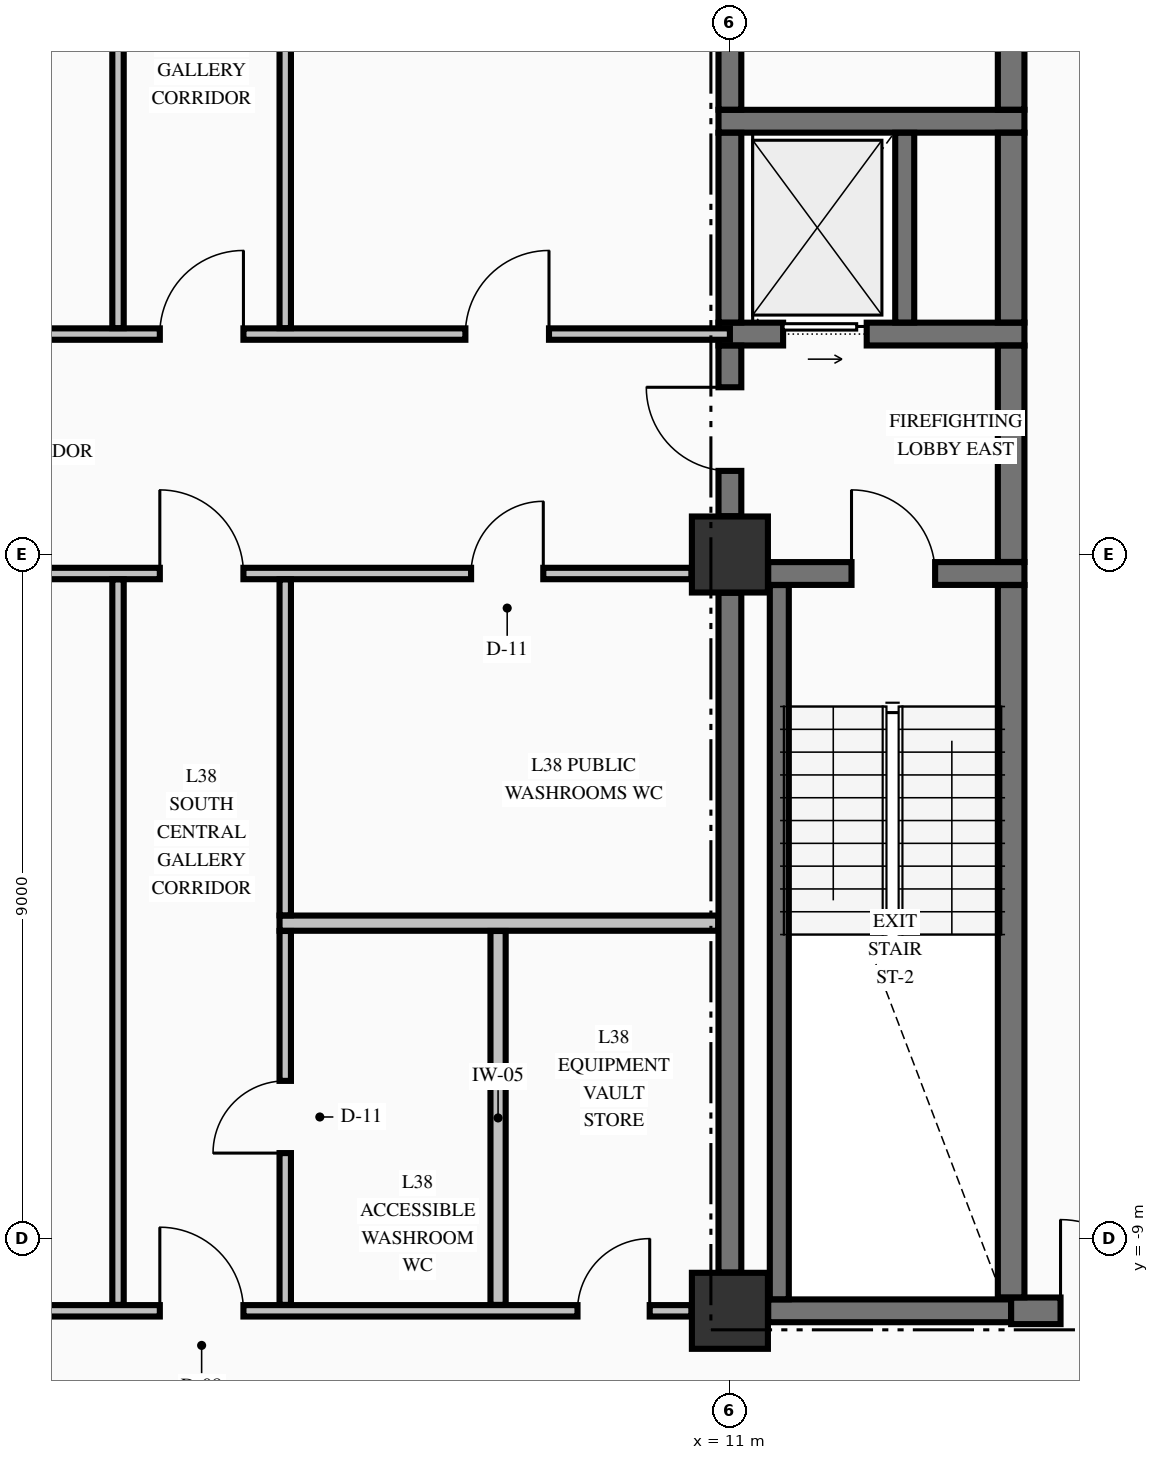
"""IFC4 building model, lengths in metres.
Left out: names, types, materials, properties, quantities, classifications, styles, units other than length and angle.
Written with IfcOpenShell. Run it as: python <this file> out.ifc"""

import sys

from ifc_helpers import new_model, si_unit, direction, frame, frame_2d, origin, origin_2d, place, context, subcontext, project, spatial, rectangle, extrude, element, fill, save


model = new_model("IFC4")
c1 = context("Model", 3, precision=1e-05, world=origin(), true_north=direction((0.0, 1.0)))
c2 = subcontext(c1, "Body", "Model", "MODEL_VIEW")
j1 = project(units=[si_unit("LENGTHUNIT", "METRE"), si_unit("PLANEANGLEUNIT", "RADIAN")], contexts=[c1])
p1 = place(None, origin())
s1 = spatial("IfcSite", under=j1, at=p1, CompositionType="ELEMENT")
p2 = place(p1, origin())
s2 = spatial("IfcBuilding", under=s1, at=p2, CompositionType="ELEMENT")
p3 = place(p2, frame((0.0, 0.0, 149.91)))
s3 = spatial("IfcBuildingStorey", under=s2, at=p3, CompositionType="ELEMENT", Elevation=149.91)
for number, where, z_axis, x_axis in (
    (1, (11.0, -9.95, -0.25), (0.0, 0.0, 1.0), (1.0, 0.0, 0.0)),
    (2, (11.0, 0.0, -0.25), (0.0, 0.0, 1.0), (1.0, 0.0, 0.0)),
):
    element("IfcColumn", number, at=place(p3, frame(where, z_axis=z_axis, x_axis=x_axis)), inside=s3, PredefinedType="COLUMN", context=c2, shape_type="SweptSolid", body=[
        extrude(rectangle(XDim=1.0, YDim=1.0, at=origin_2d()), origin(), (0.0, 0.0, 1.0), 3.395),
    ])
p4 = place(p3, frame((11.504, -9.95, 0.0), z_axis=(0.0, 0.0, 1.0), x_axis=(1.0, 0.0, 0.0)))
e3 = element("IfcWall", 3, at=p4, inside=s3, PredefinedType="SHEAR", context=c2, shape_type="SweptSolid", body=[
    extrude(rectangle(XDim=3.196, YDim=0.3, at=frame_2d((1.598, 0.0))), origin(), (0.0, 0.0, 1.0), 3.145),
])
p5 = place(p3, frame((14.7, -9.95, 0.0), z_axis=(0.0, 0.0, 1.0), x_axis=(1.0, 0.0, 0.0)))
e4 = element("IfcWall", 4, at=p5, inside=s3, PredefinedType="SHEAR", context=c2, shape_type="SweptSolid", body=[
    extrude(rectangle(XDim=4.796, YDim=0.35, at=frame_2d((2.398, 0.0))), origin(), (0.0, 0.0, 1.0), 3.145),
])
p6 = place(p5, frame((0.65, 0.0, 0.0)))
e5 = element("IfcOpeningElement", 5, at=p6, cuts=e4, PredefinedType="OPENING", context=c2, shape_type="SweptSolid", body=[
    extrude(rectangle(XDim=1.2, YDim=2.15, at=frame_2d((0.6, 1.075))), frame((0.0, 0.185, 0.0), z_axis=(0.0, -1.0, 0.0), x_axis=(1.0, 0.0, 0.0)), (0.0, 0.0, 1.0), 0.37),
])
p7 = place(p3, frame((11.504, -0.25, 0.0), z_axis=(0.0, 0.0, 1.0), x_axis=(1.0, 0.0, 0.0)))
e6 = element("IfcWall", 6, at=p7, inside=s3, PredefinedType="SHEAR", context=c2, shape_type="SweptSolid", body=[
    extrude(rectangle(XDim=3.371, YDim=0.3, at=frame_2d((1.686, 0.0))), origin(), (0.0, 0.0, 1.0), 3.145),
])
p8 = place(p7, frame((1.096, 0.0, 0.0)))
e7 = element("IfcOpeningElement", 7, at=p8, cuts=e6, PredefinedType="OPENING", context=c2, shape_type="SweptSolid", body=[
    extrude(rectangle(XDim=1.1, YDim=2.15, at=frame_2d((0.55, 1.075))), frame((0.0, 0.16, 0.0), z_axis=(0.0, -1.0, 0.0), x_axis=(1.0, 0.0, 0.0)), (0.0, 0.0, 1.0), 0.32),
])
p9 = place(p3, frame((10.85, 2.9, 0.0), z_axis=(0.0, 0.0, 1.0), x_axis=(1.0, 0.0, 0.0)))
e8 = element("IfcWall", 8, at=p9, inside=s3, PredefinedType="SHEAR", context=c2, shape_type="SweptSolid", body=[
    extrude(rectangle(XDim=4.025, YDim=0.3, at=frame_2d((2.012, 0.0))), origin(), (0.0, 0.0, 1.0), 3.145),
])
p10 = place(p9, frame((0.85, 0.0, 0.0)))
e9 = element("IfcOpeningElement", 9, at=p10, cuts=e8, PredefinedType="OPENING", context=c2, shape_type="SweptSolid", body=[
    extrude(rectangle(XDim=1.1, YDim=2.2, at=frame_2d((0.55, 1.1))), frame((0.0, 0.16, 0.0), z_axis=(0.0, -1.0, 0.0), x_axis=(1.0, 0.0, 0.0)), (0.0, 0.0, 1.0), 0.32),
])
p11 = place(p3, frame((10.85, 5.7, 0.0), z_axis=(0.0, 0.0, 1.0), x_axis=(1.0, 0.0, 0.0)))
e10 = element("IfcWall", 10, at=p11, inside=s3, PredefinedType="SHEAR", context=c2, shape_type="SweptSolid", body=[
    extrude(rectangle(XDim=4.025, YDim=0.3, at=frame_2d((2.012, 0.0))), origin(), (0.0, 0.0, 1.0), 3.145),
])
p12 = place(p3, frame((-10.494, -9.95, 0.0), z_axis=(0.0, 0.0, 1.0), x_axis=(1.0, 0.0, 0.0)))
e11 = element("IfcWall", 11, at=p12, inside=s3, PredefinedType="PARTITIONING", context=c2, shape_type="SweptSolid", body=[
    extrude(rectangle(XDim=20.988, YDim=0.15, at=frame_2d((10.494, 0.0))), origin(), (0.0, 0.0, 1.0), 3.145),
])
p13 = place(p12, frame((13.994, 0.0, 0.0)))
e12 = element("IfcOpeningElement", 12, at=p13, cuts=e11, PredefinedType="OPENING", context=c2, shape_type="SweptSolid", body=[
    extrude(rectangle(XDim=1.1, YDim=2.15, at=frame_2d((0.55, 1.075))), frame((0.0, 0.085, 0.0), z_axis=(0.0, -1.0, 0.0), x_axis=(1.0, 0.0, 0.0)), (0.0, 0.0, 1.0), 0.17),
])
p14 = place(p12, frame((19.489, 0.0, 0.0)))
e13 = element("IfcOpeningElement", 13, at=p14, cuts=e11, PredefinedType="OPENING", context=c2, shape_type="SweptSolid", body=[
    extrude(rectangle(XDim=0.95, YDim=2.15, at=frame_2d((0.475, 1.075))), frame((0.0, 0.085, 0.0), z_axis=(0.0, -1.0, 0.0), x_axis=(1.0, 0.0, 0.0)), (0.0, 0.0, 1.0), 0.17),
])
p15 = place(p3, frame((5.075, -4.85, 0.0), z_axis=(0.0, 0.0, 1.0), x_axis=(1.0, 0.0, 0.0)))
e14 = element("IfcWall", 14, at=p15, inside=s3, PredefinedType="PARTITIONING", context=c2, shape_type="SweptSolid", body=[
    extrude(rectangle(XDim=5.772, YDim=0.2, at=frame_2d((2.886, 0.0))), origin(), (0.0, 0.0, 1.0), 3.145),
])
p16 = place(p3, frame((-10.494, -0.25, 0.0), z_axis=(0.0, 0.0, 1.0), x_axis=(1.0, 0.0, 0.0)))
e15 = element("IfcWall", 15, at=p16, inside=s3, PredefinedType="PARTITIONING", context=c2, shape_type="SweptSolid", body=[
    extrude(rectangle(XDim=20.988, YDim=0.15, at=frame_2d((10.494, 0.0))), origin(), (0.0, 0.0, 1.0), 3.145),
])
p17 = place(p16, frame((13.994, 0.0, 0.0)))
e16 = element("IfcOpeningElement", 16, at=p17, cuts=e15, PredefinedType="OPENING", context=c2, shape_type="SweptSolid", body=[
    extrude(rectangle(XDim=1.1, YDim=2.15, at=frame_2d((0.55, 1.075))), frame((0.0, 0.085, 0.0), z_axis=(0.0, -1.0, 0.0), x_axis=(1.0, 0.0, 0.0)), (0.0, 0.0, 1.0), 0.17),
])
p18 = place(p16, frame((5.939, 0.0, 0.0)))
e17 = element("IfcOpeningElement", 17, at=p18, cuts=e15, PredefinedType="OPENING", context=c2, shape_type="SweptSolid", body=[
    extrude(rectangle(XDim=1.05, YDim=2.15, at=frame_2d((0.525, 1.075))), frame((0.0, 0.085, 0.0), z_axis=(0.0, -1.0, 0.0), x_axis=(1.0, 0.0, 0.0)), (0.0, 0.0, 1.0), 0.17),
])
p19 = place(p16, frame((18.089, 0.0, 0.0)))
e18 = element("IfcOpeningElement", 18, at=p19, cuts=e15, PredefinedType="OPENING", context=c2, shape_type="SweptSolid", body=[
    extrude(rectangle(XDim=0.95, YDim=2.15, at=frame_2d((0.475, 1.075))), frame((0.0, 0.085, 0.0), z_axis=(0.0, -1.0, 0.0), x_axis=(1.0, 0.0, 0.0)), (0.0, 0.0, 1.0), 0.17),
])
p20 = place(p3, frame((-11.0, 2.9, 0.0), z_axis=(0.0, 0.0, 1.0), x_axis=(1.0, 0.0, 0.0)))
e19 = element("IfcWall", 19, at=p20, inside=s3, PredefinedType="PARTITIONING", context=c2, shape_type="SweptSolid", body=[
    extrude(rectangle(XDim=22.0, YDim=0.15, at=frame_2d((11.0, 0.0))), origin(), (0.0, 0.0, 1.0), 3.145),
])
p21 = place(p20, frame((14.5, 0.0, 0.0)))
e20 = element("IfcOpeningElement", 20, at=p21, cuts=e19, PredefinedType="OPENING", context=c2, shape_type="SweptSolid", body=[
    extrude(rectangle(XDim=1.1, YDim=2.15, at=frame_2d((0.55, 1.075))), frame((0.0, 0.085, 0.0), z_axis=(0.0, -1.0, 0.0), x_axis=(1.0, 0.0, 0.0)), (0.0, 0.0, 1.0), 0.17),
])
p22 = place(p20, frame((6.445, 0.0, 0.0)))
e21 = element("IfcOpeningElement", 21, at=p22, cuts=e19, PredefinedType="OPENING", context=c2, shape_type="SweptSolid", body=[
    extrude(rectangle(XDim=1.05, YDim=2.15, at=frame_2d((0.525, 1.075))), frame((0.0, 0.085, 0.0), z_axis=(0.0, -1.0, 0.0), x_axis=(1.0, 0.0, 0.0)), (0.0, 0.0, 1.0), 0.17),
])
p23 = place(p20, frame((18.52, 0.0, 0.0)))
e22 = element("IfcOpeningElement", 22, at=p23, cuts=e19, PredefinedType="OPENING", context=c2, shape_type="SweptSolid", body=[
    extrude(rectangle(XDim=1.1, YDim=2.15, at=frame_2d((0.55, 1.075))), frame((0.0, 0.085, 0.0), z_axis=(0.0, -1.0, 0.0), x_axis=(1.0, 0.0, 0.0)), (0.0, 0.0, 1.0), 0.17),
])
p24 = place(p3, frame((11.0, -9.446, 0.0), z_axis=(0.0, 0.0, 1.0), x_axis=(0.0, 1.0, 0.0)))
e23 = element("IfcWall", 23, at=p24, inside=s3, PredefinedType="SHEAR", context=c2, shape_type="SweptSolid", body=[
    extrude(rectangle(XDim=8.942, YDim=0.3, at=frame_2d((4.471, 0.0))), origin(), (0.0, 0.0, 1.0), 3.145),
])
p25 = place(p3, frame((11.0, 0.504, 0.0), z_axis=(0.0, 0.0, 1.0), x_axis=(0.0, 1.0, 0.0)))
e24 = element("IfcWall", 24, at=p25, inside=s3, PredefinedType="SHEAR", context=c2, shape_type="SweptSolid", body=[
    extrude(rectangle(XDim=2.244, YDim=0.3, at=frame_2d((1.122, 0.0))), origin(), (0.0, 0.0, 1.0), 3.145),
])
p26 = place(p25, frame((0.596, 0.0, 0.0)))
e25 = element("IfcOpeningElement", 25, at=p26, cuts=e24, PredefinedType="OPENING", context=c2, shape_type="SweptSolid", body=[
    extrude(rectangle(XDim=1.1, YDim=2.15, at=frame_2d((0.55, 1.075))), frame((0.0, 0.16, 0.0), z_axis=(0.0, -1.0, 0.0), x_axis=(1.0, 0.0, 0.0)), (0.0, 0.0, 1.0), 0.32),
])
p27 = place(p3, frame((11.0, 3.052, 0.0), z_axis=(0.0, 0.0, 1.0), x_axis=(0.0, 1.0, 0.0)))
e26 = element("IfcWall", 26, at=p27, inside=s3, PredefinedType="SHEAR", context=c2, shape_type="SweptSolid", body=[
    extrude(rectangle(XDim=2.496, YDim=0.3, at=frame_2d((1.248, 0.0))), origin(), (0.0, 0.0, 1.0), 3.145),
])
p28 = place(p3, frame((11.0, 5.852, 0.0), z_axis=(0.0, 0.0, 1.0), x_axis=(0.0, 1.0, 0.0)))
e27 = element("IfcWall", 27, at=p28, inside=s3, PredefinedType="SHEAR", context=c2, shape_type="SweptSolid", body=[
    extrude(rectangle(XDim=4.144, YDim=0.3, at=frame_2d((2.072, 0.0))), origin(), (0.0, 0.0, 1.0), 3.145),
])
p29 = place(p3, frame((11.65, -9.798, 0.0), z_axis=(0.0, 0.0, 1.0), x_axis=(0.0, 1.0, 0.0)))
e28 = element("IfcWall", 28, at=p29, inside=s3, PredefinedType="SOLIDWALL", context=c2, shape_type="SweptSolid", body=[
    extrude(rectangle(XDim=9.396, YDim=0.25, at=frame_2d((4.698, 0.0))), origin(), (0.0, 0.0, 1.0), 3.145),
])
p30 = place(p3, frame((13.3, 3.052, 0.0), z_axis=(0.0, 0.0, 1.0), x_axis=(0.0, 1.0, 0.0)))
e29 = element("IfcWall", 29, at=p30, inside=s3, PredefinedType="SOLIDWALL", context=c2, shape_type="SweptSolid", body=[
    extrude(rectangle(XDim=2.496, YDim=0.25, at=frame_2d((1.248, 0.0))), origin(), (0.0, 0.0, 1.0), 3.145),
])
p31 = place(p3, frame((14.7, -9.773, 0.0), z_axis=(0.0, 0.0, 1.0), x_axis=(0.0, 1.0, 0.0)))
e30 = element("IfcWall", 30, at=p31, inside=s3, PredefinedType="SHEAR", context=c2, shape_type="SweptSolid", body=[
    extrude(rectangle(XDim=9.371, YDim=0.35, at=frame_2d((4.686, 0.0))), origin(), (0.0, 0.0, 1.0), 3.145),
])
p32 = place(p3, frame((14.7, -0.098, 0.0), z_axis=(0.0, 0.0, 1.0), x_axis=(0.0, 1.0, 0.0)))
e31 = element("IfcWall", 31, at=p32, inside=s3, PredefinedType="SHEAR", context=c2, shape_type="SweptSolid", body=[
    extrude(rectangle(XDim=2.846, YDim=0.35, at=frame_2d((1.423, 0.0))), origin(), (0.0, 0.0, 1.0), 3.145),
])
p33 = place(p3, frame((14.7, 3.052, 0.0), z_axis=(0.0, 0.0, 1.0), x_axis=(0.0, 1.0, 0.0)))
e32 = element("IfcWall", 32, at=p33, inside=s3, PredefinedType="SHEAR", context=c2, shape_type="SweptSolid", body=[
    extrude(rectangle(XDim=2.496, YDim=0.35, at=frame_2d((1.248, 0.0))), origin(), (0.0, 0.0, 1.0), 3.145),
])
p34 = place(p3, frame((14.7, 5.852, 0.0), z_axis=(0.0, 0.0, 1.0), x_axis=(0.0, 1.0, 0.0)))
e33 = element("IfcWall", 33, at=p34, inside=s3, PredefinedType="SHEAR", context=c2, shape_type="SweptSolid", body=[
    extrude(rectangle(XDim=4.471, YDim=0.35, at=frame_2d((2.235, 0.0))), origin(), (0.0, 0.0, 1.0), 3.145),
])
p35 = place(p3, frame((2.95, -9.872, 0.0), z_axis=(0.0, 0.0, 1.0), x_axis=(0.0, 1.0, 0.0)))
e34 = element("IfcWall", 34, at=p35, inside=s3, PredefinedType="PARTITIONING", context=c2, shape_type="SweptSolid", body=[
    extrude(rectangle(XDim=9.544, YDim=0.15, at=frame_2d((4.772, 0.0))), origin(), (0.0, 0.0, 1.0), 3.145),
])
p36 = place(p3, frame((2.95, 2.978, 0.0), z_axis=(0.0, 0.0, 1.0), x_axis=(0.0, 1.0, 0.0)))
e35 = element("IfcWall", 35, at=p36, inside=s3, PredefinedType="PARTITIONING", context=c2, shape_type="SweptSolid", body=[
    extrude(rectangle(XDim=7.444, YDim=0.15, at=frame_2d((3.722, 0.0))), origin(), (0.0, 0.0, 1.0), 3.145),
])
p37 = place(p3, frame((5.15, -9.872, 0.0), z_axis=(0.0, 0.0, 1.0), x_axis=(0.0, 1.0, 0.0)))
e36 = element("IfcWall", 36, at=p37, inside=s3, PredefinedType="PARTITIONING", context=c2, shape_type="SweptSolid", body=[
    extrude(rectangle(XDim=4.919, YDim=0.15, at=frame_2d((2.459, 0.0))), origin(), (0.0, 0.0, 1.0), 3.145),
])
p38 = place(p37, frame((1.997, 0.0, 0.0)))
e37 = element("IfcOpeningElement", 37, at=p38, cuts=e36, PredefinedType="OPENING", context=c2, shape_type="SweptSolid", body=[
    extrude(rectangle(XDim=0.95, YDim=2.15, at=frame_2d((0.475, 1.075))), frame((0.0, 0.085, 0.0), z_axis=(0.0, -1.0, 0.0), x_axis=(1.0, 0.0, 0.0)), (0.0, 0.0, 1.0), 0.17),
])
p39 = place(p3, frame((5.15, -4.747, 0.0), z_axis=(0.0, 0.0, 1.0), x_axis=(0.0, 1.0, 0.0)))
e38 = element("IfcWall", 38, at=p39, inside=s3, PredefinedType="PARTITIONING", context=c2, shape_type="SweptSolid", body=[
    extrude(rectangle(XDim=4.419, YDim=0.15, at=frame_2d((2.209, 0.0))), origin(), (0.0, 0.0, 1.0), 3.145),
])
p40 = place(p3, frame((5.15, 2.978, 0.0), z_axis=(0.0, 0.0, 1.0), x_axis=(0.0, 1.0, 0.0)))
e39 = element("IfcWall", 39, at=p40, inside=s3, PredefinedType="PARTITIONING", context=c2, shape_type="SweptSolid", body=[
    extrude(rectangle(XDim=7.444, YDim=0.15, at=frame_2d((3.722, 0.0))), origin(), (0.0, 0.0, 1.0), 3.145),
])
p41 = place(p3, frame((7.95, -9.872, 0.0), z_axis=(0.0, 0.0, 1.0), x_axis=(0.0, 1.0, 0.0)))
e40 = element("IfcWall", 40, at=p41, inside=s3, PredefinedType="PARTITIONING", context=c2, shape_type="SweptSolid", body=[
    extrude(rectangle(XDim=4.919, YDim=0.2, at=frame_2d((2.459, 0.0))), origin(), (0.0, 0.0, 1.0), 3.145),
])
p42 = place(p8, origin())
e41 = element("IfcDoor", 41, at=p42, inside=s3, OperationType="SINGLE_SWING_LEFT", PredefinedType="DOOR", context=c2, shape_type="SweptSolid", body=[
    extrude(rectangle(XDim=1.1, YDim=2.15, at=frame_2d((0.55, 1.075))), frame((0.0, 0.025, 0.0), z_axis=(0.0, -1.0, 0.0), x_axis=(1.0, 0.0, 0.0)), (0.0, 0.0, 1.0), 0.05),
])
fill(e7, e41)
p43 = place(p26, origin())
e42 = element("IfcDoor", 42, at=p43, inside=s3, OperationType="SINGLE_SWING_RIGHT", PredefinedType="DOOR", context=c2, shape_type="SweptSolid", body=[
    extrude(rectangle(XDim=1.1, YDim=2.15, at=frame_2d((0.55, 1.075))), frame((0.0, 0.025, 0.0), z_axis=(0.0, -1.0, 0.0), x_axis=(1.0, 0.0, 0.0)), (0.0, 0.0, 1.0), 0.05),
])
fill(e25, e42)
p44 = place(p10, origin())
e43 = element("IfcDoor", 43, at=p44, inside=s3, OperationType="SLIDING_TO_RIGHT", PredefinedType="DOOR", context=c2, shape_type="SweptSolid", body=[
    extrude(rectangle(XDim=1.1, YDim=2.2, at=frame_2d((0.55, 1.1))), frame((0.0, 0.025, 0.0), z_axis=(0.0, -1.0, 0.0), x_axis=(1.0, 0.0, 0.0)), (0.0, 0.0, 1.0), 0.05),
])
fill(e9, e43)
p45 = place(p6, origin())
e44 = element("IfcDoor", 44, at=p45, inside=s3, OperationType="SINGLE_SWING_LEFT", PredefinedType="DOOR", context=c2, shape_type="SweptSolid", body=[
    extrude(rectangle(XDim=1.2, YDim=2.15, at=frame_2d((0.6, 1.075))), frame((0.0, 0.025, 0.0), z_axis=(0.0, -1.0, 0.0), x_axis=(1.0, 0.0, 0.0)), (0.0, 0.0, 1.0), 0.05),
])
fill(e5, e44)
p46 = place(p13, origin())
e45 = element("IfcDoor", 45, at=p46, inside=s3, OperationType="SINGLE_SWING_LEFT", PredefinedType="DOOR", context=c2, shape_type="SweptSolid", body=[
    extrude(rectangle(XDim=1.1, YDim=2.15, at=frame_2d((0.55, 1.075))), frame((0.0, 0.025, 0.0), z_axis=(0.0, -1.0, 0.0), x_axis=(1.0, 0.0, 0.0)), (0.0, 0.0, 1.0), 0.05),
])
fill(e12, e45)
p47 = place(p21, origin())
e46 = element("IfcDoor", 46, at=p47, inside=s3, OperationType="SINGLE_SWING_RIGHT", PredefinedType="DOOR", context=c2, shape_type="SweptSolid", body=[
    extrude(rectangle(XDim=1.1, YDim=2.15, at=frame_2d((0.55, 1.075))), frame((0.0, 0.025, 0.0), z_axis=(0.0, -1.0, 0.0), x_axis=(1.0, 0.0, 0.0)), (0.0, 0.0, 1.0), 0.05),
])
fill(e20, e46)
p48 = place(p17, origin())
e47 = element("IfcDoor", 47, at=p48, inside=s3, OperationType="SINGLE_SWING_LEFT", PredefinedType="DOOR", context=c2, shape_type="SweptSolid", body=[
    extrude(rectangle(XDim=1.1, YDim=2.15, at=frame_2d((0.55, 1.075))), frame((0.0, 0.025, 0.0), z_axis=(0.0, -1.0, 0.0), x_axis=(1.0, 0.0, 0.0)), (0.0, 0.0, 1.0), 0.05),
])
fill(e16, e47)
p49 = place(p23, origin())
e48 = element("IfcDoor", 48, at=p49, inside=s3, OperationType="SINGLE_SWING_RIGHT", PredefinedType="DOOR", context=c2, shape_type="SweptSolid", body=[
    extrude(rectangle(XDim=1.1, YDim=2.15, at=frame_2d((0.55, 1.075))), frame((0.0, 0.025, 0.0), z_axis=(0.0, -1.0, 0.0), x_axis=(1.0, 0.0, 0.0)), (0.0, 0.0, 1.0), 0.05),
])
fill(e22, e48)
p50 = place(p19, origin())
e49 = element("IfcDoor", 49, at=p50, inside=s3, OperationType="SINGLE_SWING_RIGHT", PredefinedType="DOOR", context=c2, shape_type="SweptSolid", body=[
    extrude(rectangle(XDim=0.95, YDim=2.15, at=frame_2d((0.475, 1.075))), frame((0.0, 0.025, 0.0), z_axis=(0.0, -1.0, 0.0), x_axis=(1.0, 0.0, 0.0)), (0.0, 0.0, 1.0), 0.05),
])
fill(e18, e49)
p51 = place(p38, origin())
e50 = element("IfcDoor", 50, at=p51, inside=s3, OperationType="SINGLE_SWING_LEFT", PredefinedType="DOOR", context=c2, shape_type="SweptSolid", body=[
    extrude(rectangle(XDim=0.95, YDim=2.15, at=frame_2d((0.475, 1.075))), frame((0.0, 0.025, 0.0), z_axis=(0.0, -1.0, 0.0), x_axis=(1.0, 0.0, 0.0)), (0.0, 0.0, 1.0), 0.05),
])
fill(e37, e50)
p52 = place(p14, origin())
e51 = element("IfcDoor", 51, at=p52, inside=s3, OperationType="SINGLE_SWING_RIGHT", PredefinedType="DOOR", context=c2, shape_type="SweptSolid", body=[
    extrude(rectangle(XDim=0.95, YDim=2.15, at=frame_2d((0.475, 1.075))), frame((0.0, 0.025, 0.0), z_axis=(0.0, -1.0, 0.0), x_axis=(1.0, 0.0, 0.0)), (0.0, 0.0, 1.0), 0.05),
])
fill(e13, e51)
save(model, sys.argv[1])
